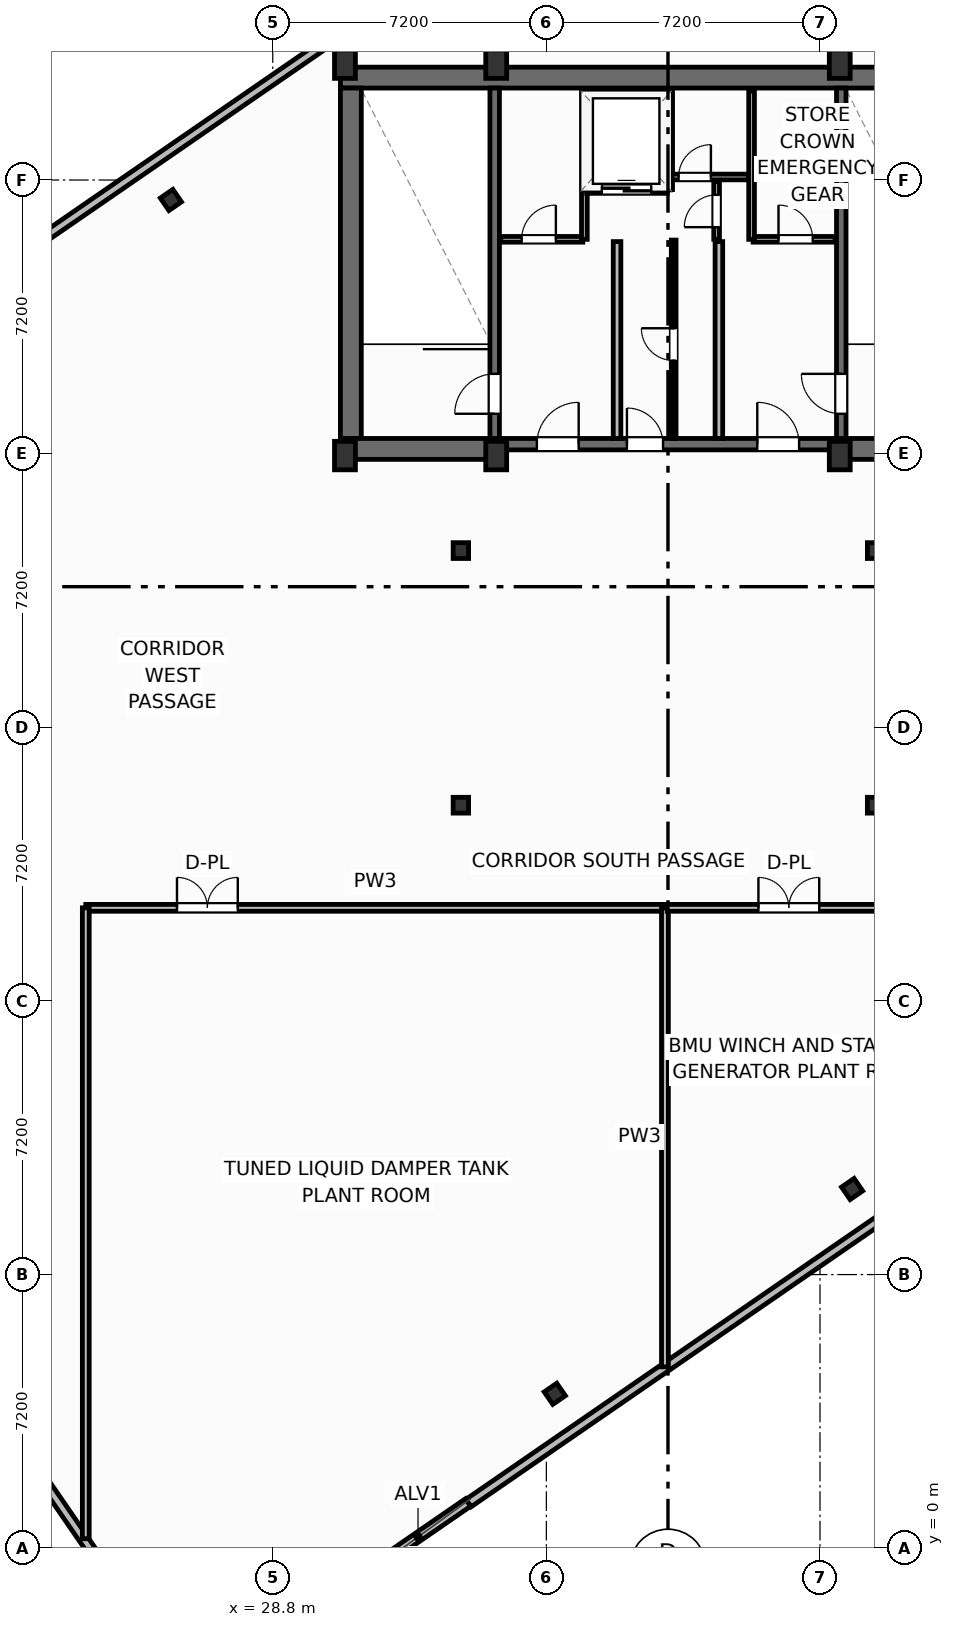
"""IFC4 building model, lengths in metres.
Left out: names, types, materials, properties, quantities, classifications, styles, units other than length and angle.
Written with IfcOpenShell. Run it as: python <this file> out.ifc"""

import sys

from ifc_helpers import new_model, si_unit, direction, frame, frame_2d, origin, origin_2d, place, context, subcontext, project, spatial, rectangle, i_section, extrude, element, fill, save


model = new_model("IFC4")
c1 = context("Model", 3, precision=1e-05, world=origin(), true_north=direction((0.0, 1.0)))
c2 = subcontext(c1, "Body", "Model", "MODEL_VIEW")
j1 = project(units=[si_unit("LENGTHUNIT", "METRE"), si_unit("PLANEANGLEUNIT", "RADIAN")], contexts=[c1])
p1 = place(None, origin())
s1 = spatial("IfcSite", under=j1, at=p1, CompositionType="ELEMENT")
p2 = place(p1, origin())
s2 = spatial("IfcBuilding", under=s1, at=p2, CompositionType="ELEMENT")
p3 = place(p2, frame((0.0, 0.0, 305.9)))
s3 = spatial("IfcBuildingStorey", under=s2, at=p3, CompositionType="ELEMENT", Elevation=305.9)
for number, where, z_axis, x_axis in (
    (1, (30.7, 28.75, 0.0), (0.0, 0.0, 1.0), (1.0, 0.0, 0.0)),
    (2, (34.68, 28.75, 0.0), (0.0, 0.0, 1.0), (1.0, 0.0, 0.0)),
    (3, (43.72, 28.75, 0.0), (0.0, 0.0, 1.0), (1.0, 0.0, 0.0)),
    (4, (30.7, 39.05, 0.0), (0.0, 0.0, 1.0), (1.0, 0.0, 0.0)),
    (5, (34.68, 39.05, 0.0), (0.0, 0.0, 1.0), (1.0, 0.0, 0.0)),
    (6, (43.72, 39.05, 0.0), (0.0, 0.0, 1.0), (1.0, 0.0, 0.0)),
):
    element("IfcColumn", number, at=place(p3, frame(where, z_axis=z_axis, x_axis=x_axis)), inside=s3, PredefinedType="COLUMN", context=c2, shape_type="SweptSolid", body=[
        extrude(rectangle(XDim=0.55, YDim=0.75, at=origin_2d()), origin(), (0.0, 0.0, 1.0), 4.8),
    ])
for number, where, z_axis, x_axis in (
    (7, (33.75, 19.55, 0.0), (0.0, 0.0, 1.0), (1.0, 0.0, 0.0)),
    (8, (44.65, 19.55, 0.0), (0.0, 0.0, 1.0), (1.0, 0.0, 0.0)),
    (9, (33.75, 26.25, 0.0), (0.0, 0.0, 1.0), (1.0, 0.0, 0.0)),
    (10, (44.65, 26.25, 0.0), (0.0, 0.0, 1.0), (1.0, 0.0, 0.0)),
):
    element("IfcColumn", number, at=place(p3, frame(where, z_axis=z_axis, x_axis=x_axis)), inside=s3, PredefinedType="COLUMN", context=c2, shape_type="SweptSolid", body=[
        extrude(i_section(OverallWidth=0.406, OverallDepth=0.416, WebThickness=0.03, FlangeThickness=0.048, FilletRadius=0.025, at=origin_2d()), origin(), (0.0, 0.0, 1.0), 4.8),
    ])
p4 = place(p3, frame((30.58, 38.695, 0.0), z_axis=(0.0, 0.0, 1.0), x_axis=(1.0, 0.0, 0.0)))
e11 = element("IfcWall", 11, at=p4, inside=s3, PredefinedType="SHEAR", context=c2, shape_type="SweptSolid", body=[
    extrude(rectangle(XDim=17.24, YDim=0.55, at=frame_2d((8.62, 0.0))), origin(), (0.0, 0.0, 1.0), 4.54),
])
p5 = place(p3, frame((30.855, 29.2, 0.0), z_axis=(0.0, 0.0, 1.0), x_axis=(0.0, 1.0, 0.0)))
e12 = element("IfcWall", 12, at=p5, inside=s3, PredefinedType="SHEAR", context=c2, shape_type="SweptSolid", body=[
    extrude(rectangle(XDim=9.22, YDim=0.55, at=frame_2d((4.61, 0.0))), origin(), (0.0, 0.0, 1.0), 4.54),
])
for number, where, z_axis, x_axis in (
    (13, (30.58, 28.925, 0.0), (0.0, 0.0, 1.0), (1.0, 0.0, 0.0)),
    (14, (43.6, 28.925, 0.0), (0.0, 0.0, 1.0), (1.0, 0.0, 0.0)),
):
    element("IfcWall", number, at=place(p3, frame(where, z_axis=z_axis, x_axis=x_axis)), inside=s3, PredefinedType="SHEAR", context=c2, shape_type="SweptSolid", body=[
        extrude(rectangle(XDim=4.22, YDim=0.55, at=frame_2d((2.11, 0.0))), origin(), (0.0, 0.0, 1.0), 4.54),
    ])
p6 = place(p3, frame((34.8, 29.05, 0.0), z_axis=(0.0, 0.0, 1.0), x_axis=(1.0, 0.0, 0.0)))
e15 = element("IfcWall", 15, at=p6, inside=s3, PredefinedType="SHEAR", context=c2, shape_type="SweptSolid", body=[
    extrude(rectangle(XDim=8.8, YDim=0.3, at=frame_2d((4.4, 0.0))), origin(), (0.0, 0.0, 1.0), 4.54),
])
p7 = place(p6, frame((0.95, 0.0, 0.0)))
e16 = element("IfcOpeningElement", 16, at=p7, cuts=e15, PredefinedType="OPENING", context=c2, shape_type="SweptSolid", body=[
    extrude(rectangle(XDim=1.1, YDim=2.15, at=frame_2d((0.55, 1.075))), frame((0.0, 0.16, 0.0), z_axis=(0.0, -1.0, 0.0), x_axis=(1.0, 0.0, 0.0)), (0.0, 0.0, 1.0), 0.32),
])
p8 = place(p6, frame((6.75, 0.0, 0.0)))
e17 = element("IfcOpeningElement", 17, at=p8, cuts=e15, PredefinedType="OPENING", context=c2, shape_type="SweptSolid", body=[
    extrude(rectangle(XDim=1.1, YDim=2.15, at=frame_2d((0.55, 1.075))), frame((0.0, 0.16, 0.0), z_axis=(0.0, -1.0, 0.0), x_axis=(1.0, 0.0, 0.0)), (0.0, 0.0, 1.0), 0.32),
])
p9 = place(p6, frame((3.32, 0.0, 0.0)))
e18 = element("IfcOpeningElement", 18, at=p9, cuts=e15, PredefinedType="OPENING", context=c2, shape_type="SweptSolid", body=[
    extrude(rectangle(XDim=0.95, YDim=2.15, at=frame_2d((0.475, 1.075))), frame((0.0, 0.16, 0.0), z_axis=(0.0, -1.0, 0.0), x_axis=(1.0, 0.0, 0.0)), (0.0, 0.0, 1.0), 0.32),
])
p10 = place(p3, frame((34.64, 29.2, 0.0), z_axis=(0.0, 0.0, 1.0), x_axis=(0.0, 1.0, 0.0)))
e19 = element("IfcWall", 19, at=p10, inside=s3, PredefinedType="SHEAR", context=c2, shape_type="SweptSolid", body=[
    extrude(rectangle(XDim=9.22, YDim=0.25, at=frame_2d((4.61, 0.0))), origin(), (0.0, 0.0, 1.0), 4.54),
])
p11 = place(p10, frame((0.65, 0.0, 0.0)))
e20 = element("IfcOpeningElement", 20, at=p11, cuts=e19, PredefinedType="OPENING", context=c2, shape_type="SweptSolid", body=[
    extrude(rectangle(XDim=1.05, YDim=2.15, at=frame_2d((0.525, 1.075))), frame((0.0, 0.135, 0.0), z_axis=(0.0, -1.0, 0.0), x_axis=(1.0, 0.0, 0.0)), (0.0, 0.0, 1.0), 0.27),
])
p12 = place(p3, frame((43.76, 29.2, 0.0), z_axis=(0.0, 0.0, 1.0), x_axis=(0.0, 1.0, 0.0)))
e21 = element("IfcWall", 21, at=p12, inside=s3, PredefinedType="SHEAR", context=c2, shape_type="SweptSolid", body=[
    extrude(rectangle(XDim=9.22, YDim=0.25, at=frame_2d((4.61, 0.0))), origin(), (0.0, 0.0, 1.0), 4.54),
])
p13 = place(p12, frame((0.65, 0.0, 0.0)))
e22 = element("IfcOpeningElement", 22, at=p13, cuts=e21, PredefinedType="OPENING", context=c2, shape_type="SweptSolid", body=[
    extrude(rectangle(XDim=1.05, YDim=2.15, at=frame_2d((0.525, 1.075))), frame((0.0, 0.135, 0.0), z_axis=(0.0, -1.0, 0.0), x_axis=(1.0, 0.0, 0.0)), (0.0, 0.0, 1.0), 0.27),
])
for number, where, z_axis, x_axis in (
    (23, (36.222, 4.063, 0.0), (0.0, 0.0, 1.0), (0.824, 0.567, 0.0)),
    (24, (44.045, 9.452, 0.0), (0.0, 0.0, 1.0), (0.824, 0.567, 0.0)),
    (25, (26.119, 35.476, 0.0), (0.0, 0.0, 1.0), (0.824, 0.567, 0.0)),
):
    element("IfcColumn", number, at=place(p3, frame(where, z_axis=z_axis, x_axis=x_axis)), inside=s3, PredefinedType="COLUMN", context=c2, shape_type="SweptSolid", body=[
        extrude(i_section(OverallWidth=0.401, OverallDepth=0.399, WebThickness=0.025, FlangeThickness=0.04, FilletRadius=0.022, at=origin_2d()), origin(), (0.0, 0.0, 1.0), 4.8),
    ])
p14 = place(p3, frame((33.941, 1.204, 0.0), z_axis=(0.0, 0.0, 1.0), x_axis=(-0.823538491217, -0.567260393015, 0.0)))
e26 = element("IfcWall", 26, at=p14, inside=s3, PredefinedType="SOLIDWALL", context=c2, shape_type="SweptSolid", body=[
    extrude(rectangle(XDim=3.2, YDim=0.24, at=frame_2d((1.6, 0.0))), origin(), (0.0, 0.0, 1.0), 0.65),
])
p15 = place(p3, frame((33.952, 1.188, 0.0), z_axis=(0.0, 0.0, 1.0), x_axis=(0.823534980344, 0.567265490005, 0.0)))
e27 = element("IfcWall", 27, at=p15, inside=s3, PredefinedType="SOLIDWALL", context=c2, shape_type="SweptSolid", body=[
    extrude(rectangle(XDim=36.01, YDim=0.24, at=frame_2d((18.005, 0.0))), origin(), (0.0, 0.0, 1.0), 3.82),
])
p16 = place(p3, frame((44.448, 49.412, 0.0), z_axis=(0.0, 0.0, 1.0), x_axis=(-0.823531813074, -0.567270088102, 0.0)))
e28 = element("IfcWall", 28, at=p16, inside=s3, PredefinedType="SOLIDWALL", context=c2, shape_type="SweptSolid", body=[
    extrude(rectangle(XDim=36.01, YDim=0.24, at=frame_2d((18.005, 0.0))), origin(), (0.0, 0.0, 1.0), 3.82),
])
p17 = place(p3, frame((9.991, 20.319, 0.0), z_axis=(0.0, 0.0, 1.0), x_axis=(0.567271592362, -0.823530776898, 0.0)))
e29 = element("IfcWall", 29, at=p17, inside=s3, PredefinedType="SOLIDWALL", context=c2, shape_type="SweptSolid", body=[
    extrude(rectangle(XDim=24.934, YDim=0.24, at=frame_2d((12.467, 0.0))), origin(), (0.0, 0.0, 1.0), 3.82),
])
p18 = place(p3, frame((23.88, 16.85, 0.0), z_axis=(0.0, 0.0, 1.0), x_axis=(1.0, 0.0, 0.0)))
e30 = element("IfcWall", 30, at=p18, inside=s3, PredefinedType="PARTITIONING", context=c2, shape_type="SweptSolid", body=[
    extrude(rectangle(XDim=15.24, YDim=0.18, at=frame_2d((7.62, 0.0))), origin(), (0.0, 0.0, 1.0), 4.54),
])
p19 = place(p18, frame((2.4, 0.0, 0.0)))
e31 = element("IfcOpeningElement", 31, at=p19, cuts=e30, PredefinedType="OPENING", context=c2, shape_type="SweptSolid", body=[
    extrude(rectangle(XDim=1.6, YDim=2.05, at=frame_2d((0.8, 1.025))), frame((0.0, 0.1, 0.0), z_axis=(0.0, -1.0, 0.0), x_axis=(1.0, 0.0, 0.0)), (0.0, 0.0, 1.0), 0.2),
])
p20 = place(p3, frame((39.12, 4.772, 0.0), z_axis=(0.0, 0.0, 1.0), x_axis=(0.0, 1.0, 0.0)))
e32 = element("IfcWall", 32, at=p20, inside=s3, PredefinedType="PARTITIONING", context=c2, shape_type="SweptSolid", body=[
    extrude(rectangle(XDim=12.078, YDim=0.18, at=frame_2d((6.039, 0.0))), origin(), (0.0, 0.0, 1.0), 4.54),
])
p21 = place(p3, frame((23.88, 0.25, 0.0), z_axis=(0.0, 0.0, 1.0), x_axis=(0.0, 1.0, 0.0)))
e33 = element("IfcWall", 33, at=p21, inside=s3, PredefinedType="PARTITIONING", context=c2, shape_type="SweptSolid", body=[
    extrude(rectangle(XDim=16.6, YDim=0.18, at=frame_2d((8.3, 0.0))), origin(), (0.0, 0.0, 1.0), 4.54),
])
p22 = place(p3, frame((39.18, 16.85, 0.0), z_axis=(0.0, 0.0, 1.0), x_axis=(1.0, 0.0, 0.0)))
e34 = element("IfcWall", 34, at=p22, inside=s3, PredefinedType="PARTITIONING", context=c2, shape_type="SweptSolid", body=[
    extrude(rectangle(XDim=14.94, YDim=0.18, at=frame_2d((7.47, 0.0))), origin(), (0.0, 0.0, 1.0), 4.54),
])
p23 = place(p22, frame((2.4, 0.0, 0.0)))
e35 = element("IfcOpeningElement", 35, at=p23, cuts=e34, PredefinedType="OPENING", context=c2, shape_type="SweptSolid", body=[
    extrude(rectangle(XDim=1.6, YDim=2.05, at=frame_2d((0.8, 1.025))), frame((0.0, 0.1, 0.0), z_axis=(0.0, -1.0, 0.0), x_axis=(1.0, 0.0, 0.0)), (0.0, 0.0, 1.0), 0.2),
])
for number, where, z_axis, x_axis in (
    (36, (37.86, 29.2, 0.0), (0.0, 0.0, 1.0), (0.0, 1.0, 0.0)),
    (37, (40.54, 29.2, 0.0), (0.0, 0.0, 1.0), (0.0, 1.0, 0.0)),
):
    element("IfcWall", number, at=place(p3, frame(where, z_axis=z_axis, x_axis=x_axis)), inside=s3, PredefinedType="PARTITIONING", context=c2, shape_type="SweptSolid", body=[
        extrude(rectangle(XDim=5.18, YDim=0.2, at=frame_2d((2.59, 0.0))), origin(), (0.0, 0.0, 1.0), 4.54),
    ])
p24 = place(p3, frame((34.8, 34.44, 0.0), z_axis=(0.0, 0.0, 1.0), x_axis=(1.0, 0.0, 0.0)))
e38 = element("IfcWall", 38, at=p24, inside=s3, PredefinedType="PARTITIONING", context=c2, shape_type="SweptSolid", body=[
    extrude(rectangle(XDim=2.16, YDim=0.15, at=frame_2d((1.08, 0.0))), origin(), (0.0, 0.0, 1.0), 4.54),
])
p25 = place(p24, frame((0.55, 0.0, 0.0)))
e39 = element("IfcOpeningElement", 39, at=p25, cuts=e38, PredefinedType="OPENING", context=c2, shape_type="SweptSolid", body=[
    extrude(rectangle(XDim=0.9, YDim=2.05, at=frame_2d((0.45, 1.025))), frame((0.0, 0.085, 0.0), z_axis=(0.0, -1.0, 0.0), x_axis=(1.0, 0.0, 0.0)), (0.0, 0.0, 1.0), 0.17),
])
p26 = place(p3, frame((37.0, 34.44, 0.0), z_axis=(0.0, 0.0, 1.0), x_axis=(0.0, 1.0, 0.0)))
e40 = element("IfcWall", 40, at=p26, inside=s3, PredefinedType="PARTITIONING", context=c2, shape_type="SweptSolid", body=[
    extrude(rectangle(XDim=3.9, YDim=0.15, at=frame_2d((1.95, 0.0))), origin(), (0.0, 0.0, 1.0), 4.54),
])
p27 = place(p3, frame((41.44, 34.44, 0.0), z_axis=(0.0, 0.0, 1.0), x_axis=(1.0, 0.0, 0.0)))
e41 = element("IfcWall", 41, at=p27, inside=s3, PredefinedType="PARTITIONING", context=c2, shape_type="SweptSolid", body=[
    extrude(rectangle(XDim=2.16, YDim=0.15, at=frame_2d((1.08, 0.0))), origin(), (0.0, 0.0, 1.0), 4.54),
])
p28 = place(p27, frame((0.668, 0.0, 0.0)))
e42 = element("IfcOpeningElement", 42, at=p28, cuts=e41, PredefinedType="OPENING", context=c2, shape_type="SweptSolid", body=[
    extrude(rectangle(XDim=0.9, YDim=2.05, at=frame_2d((0.45, 1.025))), frame((0.0, 0.085, 0.0), z_axis=(0.0, -1.0, 0.0), x_axis=(1.0, 0.0, 0.0)), (0.0, 0.0, 1.0), 0.17),
])
p29 = place(p3, frame((41.4, 34.44, 0.0), z_axis=(0.0, 0.0, 1.0), x_axis=(0.0, 1.0, 0.0)))
e43 = element("IfcWall", 43, at=p29, inside=s3, PredefinedType="PARTITIONING", context=c2, shape_type="SweptSolid", body=[
    extrude(rectangle(XDim=3.9, YDim=0.15, at=frame_2d((1.95, 0.0))), origin(), (0.0, 0.0, 1.0), 4.54),
])
p30 = place(p3, frame((37.06, 35.75, 0.0), z_axis=(0.0, 0.0, 1.0), x_axis=(1.0, 0.0, 0.0)))
e44 = element("IfcWall", 44, at=p30, inside=s3, PredefinedType="PARTITIONING", context=c2, shape_type="SweptSolid", body=[
    extrude(rectangle(XDim=2.12, YDim=0.2, at=frame_2d((1.06, 0.0))), origin(), (0.0, 0.0, 1.0), 4.54),
])
p31 = place(p30, frame((0.4, 0.0, 0.0)))
e45 = element("IfcOpeningElement", 45, at=p31, cuts=e44, PredefinedType="OPENING", context=c2, shape_type="SweptSolid", body=[
    extrude(rectangle(XDim=1.3, YDim=2.2, at=frame_2d((0.65, 1.1))), frame((0.0, 0.11, 0.0), z_axis=(0.0, -1.0, 0.0), x_axis=(1.0, 0.0, 0.0)), (0.0, 0.0, 1.0), 0.22),
])
p32 = place(p3, frame((39.22, 35.75, 0.0), z_axis=(0.0, 0.0, 1.0), x_axis=(0.0, 1.0, 0.0)))
e46 = element("IfcWall", 46, at=p32, inside=s3, PredefinedType="PARTITIONING", context=c2, shape_type="SweptSolid", body=[
    extrude(rectangle(XDim=2.59, YDim=0.2, at=frame_2d((1.295, 0.0))), origin(), (0.0, 0.0, 1.0), 4.54),
])
p33 = place(p3, frame((39.3, 36.08, 0.0), z_axis=(0.0, 0.0, 1.0), x_axis=(1.0, 0.0, 0.0)))
e47 = element("IfcWall", 47, at=p33, inside=s3, PredefinedType="PARTITIONING", context=c2, shape_type="SweptSolid", body=[
    extrude(rectangle(XDim=2.02, YDim=0.15, at=frame_2d((1.01, 0.0))), origin(), (0.0, 0.0, 1.0), 4.54),
])
p34 = place(p33, frame((0.18, 0.0, 0.0)))
e48 = element("IfcOpeningElement", 48, at=p34, cuts=e47, PredefinedType="OPENING", context=c2, shape_type="SweptSolid", body=[
    extrude(rectangle(XDim=0.85, YDim=2.05, at=frame_2d((0.425, 1.025))), frame((0.0, 0.085, 0.0), z_axis=(0.0, -1.0, 0.0), x_axis=(1.0, 0.0, 0.0)), (0.0, 0.0, 1.0), 0.17),
])
p35 = place(p3, frame((40.48, 34.44, 0.0), z_axis=(0.0, 0.0, 1.0), x_axis=(0.0, 1.0, 0.0)))
e49 = element("IfcWall", 49, at=p35, inside=s3, PredefinedType="PARTITIONING", context=c2, shape_type="SweptSolid", body=[
    extrude(rectangle(XDim=1.52, YDim=0.15, at=frame_2d((0.76, 0.0))), origin(), (0.0, 0.0, 1.0), 4.54),
])
p36 = place(p35, frame((0.32, 0.0, 0.0)))
e50 = element("IfcOpeningElement", 50, at=p36, cuts=e49, PredefinedType="OPENING", context=c2, shape_type="SweptSolid", body=[
    extrude(rectangle(XDim=0.85, YDim=2.05, at=frame_2d((0.425, 1.025))), frame((0.0, 0.085, 0.0), z_axis=(0.0, -1.0, 0.0), x_axis=(1.0, 0.0, 0.0)), (0.0, 0.0, 1.0), 0.17),
])
p37 = place(p3, frame((39.35, 29.2, 0.0), z_axis=(0.0, 0.0, 1.0), x_axis=(0.0, 1.0, 0.0)))
e51 = element("IfcWall", 51, at=p37, inside=s3, PredefinedType="PARTITIONING", context=c2, shape_type="SweptSolid", body=[
    extrude(rectangle(XDim=5.22, YDim=0.125, at=frame_2d((2.61, 0.0))), origin(), (0.0, 0.0, 1.0), 4.54),
])
p38 = place(p37, frame((2.05, 0.0, 0.0)))
e52 = element("IfcOpeningElement", 52, at=p38, cuts=e51, PredefinedType="OPENING", context=c2, shape_type="SweptSolid", body=[
    extrude(rectangle(XDim=0.85, YDim=2.05, at=frame_2d((0.425, 1.025))), frame((0.0, 0.073, 0.0), z_axis=(0.0, -1.0, 0.0), x_axis=(1.0, 0.0, 0.0)), (0.0, 0.0, 1.0), 0.145),
])
p39 = place(p19, origin())
e53 = element("IfcDoor", 53, at=p39, inside=s3, OperationType="DOUBLE_DOOR_SINGLE_SWING", PredefinedType="DOOR", context=c2, shape_type="SweptSolid", body=[
    extrude(rectangle(XDim=1.6, YDim=2.05, at=frame_2d((0.8, 1.025))), frame((0.0, 0.025, 0.0), z_axis=(0.0, -1.0, 0.0), x_axis=(1.0, 0.0, 0.0)), (0.0, 0.0, 1.0), 0.05),
])
fill(e31, e53)
p40 = place(p23, origin())
e54 = element("IfcDoor", 54, at=p40, inside=s3, OperationType="DOUBLE_DOOR_SINGLE_SWING", PredefinedType="DOOR", context=c2, shape_type="SweptSolid", body=[
    extrude(rectangle(XDim=1.6, YDim=2.05, at=frame_2d((0.8, 1.025))), frame((0.0, 0.025, 0.0), z_axis=(0.0, -1.0, 0.0), x_axis=(1.0, 0.0, 0.0)), (0.0, 0.0, 1.0), 0.05),
])
fill(e35, e54)
p41 = place(p11, origin())
e55 = element("IfcDoor", 55, at=p41, inside=s3, OperationType="SINGLE_SWING_LEFT", PredefinedType="DOOR", context=c2, shape_type="SweptSolid", body=[
    extrude(rectangle(XDim=1.05, YDim=2.15, at=frame_2d((0.525, 1.075))), frame((0.0, 0.025, 0.0), z_axis=(0.0, -1.0, 0.0), x_axis=(1.0, 0.0, 0.0)), (0.0, 0.0, 1.0), 0.05),
])
fill(e20, e55)
p42 = place(p13, origin())
e56 = element("IfcDoor", 56, at=p42, inside=s3, OperationType="SINGLE_SWING_RIGHT", PredefinedType="DOOR", context=c2, shape_type="SweptSolid", body=[
    extrude(rectangle(XDim=1.05, YDim=2.15, at=frame_2d((0.525, 1.075))), frame((0.0, 0.025, 0.0), z_axis=(0.0, -1.0, 0.0), x_axis=(1.0, 0.0, 0.0)), (0.0, 0.0, 1.0), 0.05),
])
fill(e22, e56)
p43 = place(p7, origin())
e57 = element("IfcDoor", 57, at=p43, inside=s3, OperationType="SINGLE_SWING_RIGHT", PredefinedType="DOOR", context=c2, shape_type="SweptSolid", body=[
    extrude(rectangle(XDim=1.1, YDim=2.15, at=frame_2d((0.55, 1.075))), frame((0.0, 0.025, 0.0), z_axis=(0.0, -1.0, 0.0), x_axis=(1.0, 0.0, 0.0)), (0.0, 0.0, 1.0), 0.05),
])
fill(e16, e57)
p44 = place(p8, origin())
e58 = element("IfcDoor", 58, at=p44, inside=s3, OperationType="SINGLE_SWING_LEFT", PredefinedType="DOOR", context=c2, shape_type="SweptSolid", body=[
    extrude(rectangle(XDim=1.1, YDim=2.15, at=frame_2d((0.55, 1.075))), frame((0.0, 0.025, 0.0), z_axis=(0.0, -1.0, 0.0), x_axis=(1.0, 0.0, 0.0)), (0.0, 0.0, 1.0), 0.05),
])
fill(e17, e58)
p45 = place(p25, origin())
e59 = element("IfcDoor", 59, at=p45, inside=s3, OperationType="SINGLE_SWING_RIGHT", PredefinedType="DOOR", context=c2, shape_type="SweptSolid", body=[
    extrude(rectangle(XDim=0.9, YDim=2.05, at=frame_2d((0.45, 1.025))), frame((0.0, 0.025, 0.0), z_axis=(0.0, -1.0, 0.0), x_axis=(1.0, 0.0, 0.0)), (0.0, 0.0, 1.0), 0.05),
])
fill(e39, e59)
p46 = place(p28, origin())
e60 = element("IfcDoor", 60, at=p46, inside=s3, OperationType="SINGLE_SWING_LEFT", PredefinedType="DOOR", context=c2, shape_type="SweptSolid", body=[
    extrude(rectangle(XDim=0.9, YDim=2.05, at=frame_2d((0.45, 1.025))), frame((0.0, 0.025, 0.0), z_axis=(0.0, -1.0, 0.0), x_axis=(1.0, 0.0, 0.0)), (0.0, 0.0, 1.0), 0.05),
])
fill(e42, e60)
p47 = place(p31, origin())
e61 = element("IfcDoor", 61, at=p47, inside=s3, OperationType="SLIDING_TO_LEFT", PredefinedType="DOOR", context=c2, shape_type="SweptSolid", body=[
    extrude(rectangle(XDim=1.3, YDim=2.2, at=frame_2d((0.65, 1.1))), frame((0.0, 0.025, 0.0), z_axis=(0.0, -1.0, 0.0), x_axis=(1.0, 0.0, 0.0)), (0.0, 0.0, 1.0), 0.05),
])
fill(e45, e61)
p48 = place(p34, origin())
e62 = element("IfcDoor", 62, at=p48, inside=s3, OperationType="SINGLE_SWING_RIGHT", PredefinedType="DOOR", context=c2, shape_type="SweptSolid", body=[
    extrude(rectangle(XDim=0.85, YDim=2.05, at=frame_2d((0.425, 1.025))), frame((0.0, 0.025, 0.0), z_axis=(0.0, -1.0, 0.0), x_axis=(1.0, 0.0, 0.0)), (0.0, 0.0, 1.0), 0.05),
])
fill(e48, e62)
p49 = place(p36, origin())
e63 = element("IfcDoor", 63, at=p49, inside=s3, OperationType="SINGLE_SWING_LEFT", PredefinedType="DOOR", context=c2, shape_type="SweptSolid", body=[
    extrude(rectangle(XDim=0.85, YDim=2.05, at=frame_2d((0.425, 1.025))), frame((0.0, 0.025, 0.0), z_axis=(0.0, -1.0, 0.0), x_axis=(1.0, 0.0, 0.0)), (0.0, 0.0, 1.0), 0.05),
])
fill(e50, e63)
p50 = place(p38, origin())
e64 = element("IfcDoor", 64, at=p50, inside=s3, OperationType="SINGLE_SWING_RIGHT", PredefinedType="DOOR", context=c2, shape_type="SweptSolid", body=[
    extrude(rectangle(XDim=0.85, YDim=2.05, at=frame_2d((0.425, 1.025))), frame((0.0, 0.025, 0.0), z_axis=(0.0, -1.0, 0.0), x_axis=(1.0, 0.0, 0.0)), (0.0, 0.0, 1.0), 0.05),
])
fill(e52, e64)
p51 = place(p9, origin())
e65 = element("IfcDoor", 65, at=p51, inside=s3, OperationType="SINGLE_SWING_LEFT", PredefinedType="DOOR", context=c2, shape_type="SweptSolid", body=[
    extrude(rectangle(XDim=0.95, YDim=2.15, at=frame_2d((0.475, 1.075))), frame((0.0, 0.025, 0.0), z_axis=(0.0, -1.0, 0.0), x_axis=(1.0, 0.0, 0.0)), (0.0, 0.0, 1.0), 0.05),
])
fill(e18, e65)
save(model, sys.argv[1])
